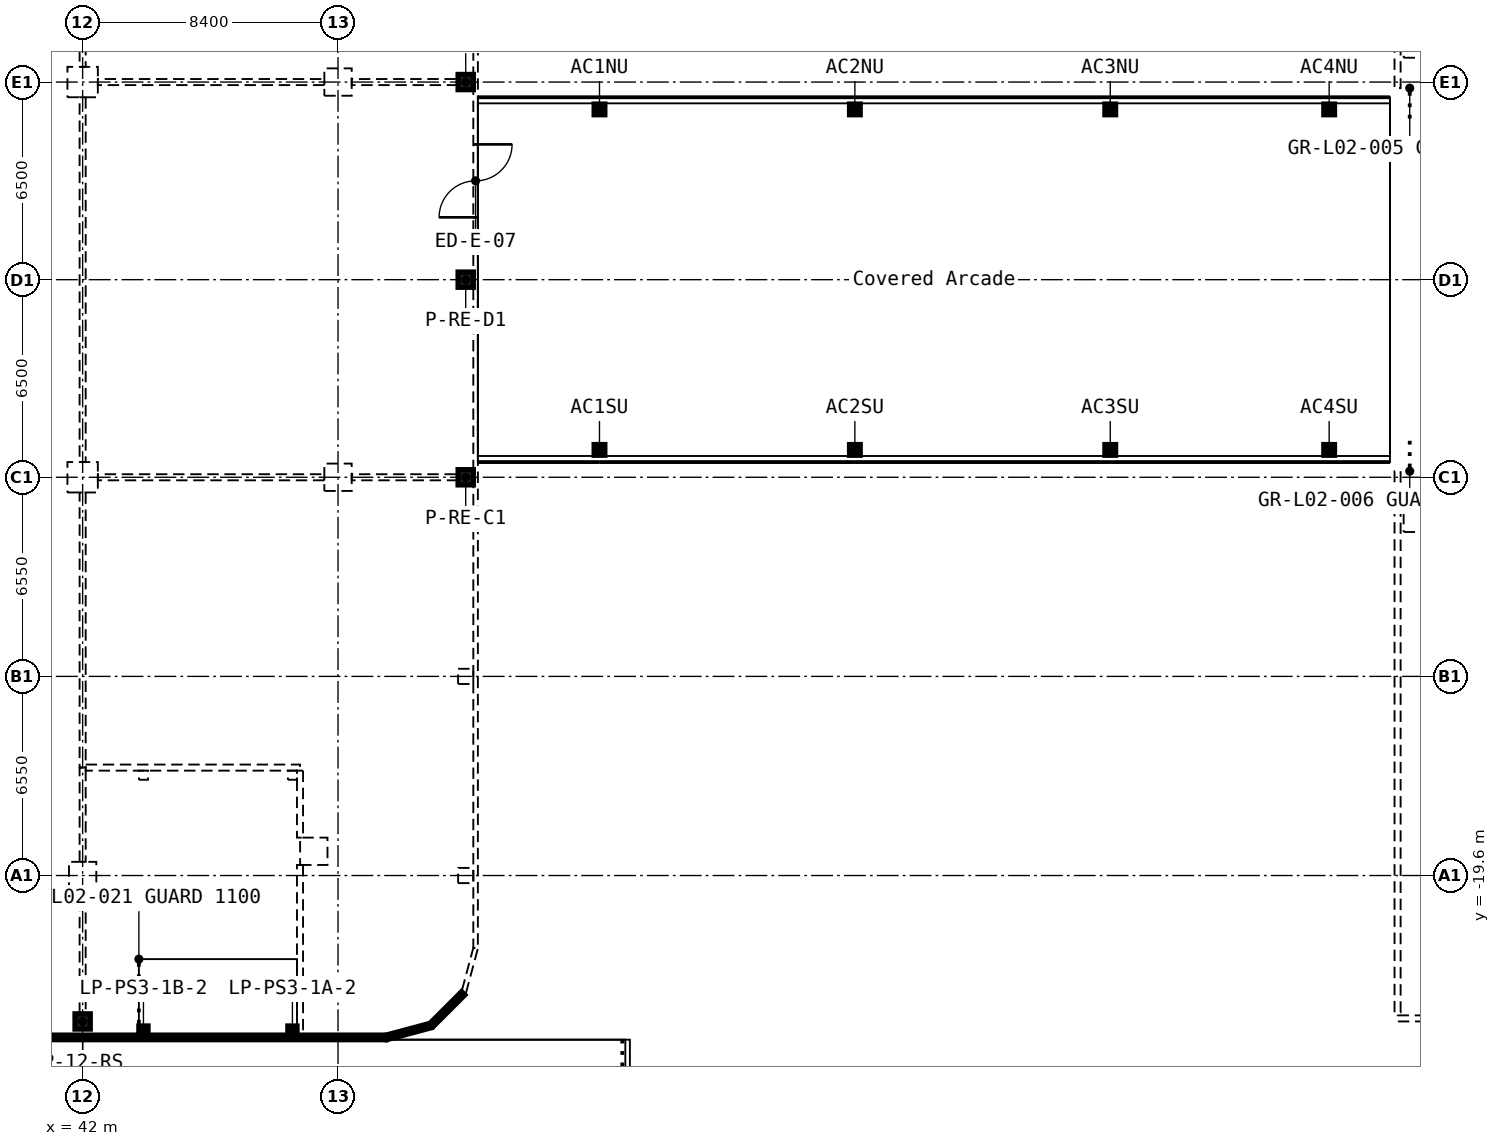
"""IFC4 building model, lengths in metres.
Left out: names, types, materials, properties, quantities, classifications, styles, units other than length and angle.
Written with IfcOpenShell. Run it as: python <this file> out.ifc"""

import sys

from ifc_helpers import new_model, si_unit, direction, frame, frame_2d, origin, origin_2d, place, context, subcontext, project, spatial, rectangle, hollow_rectangle, extrude, element, fill, save


model = new_model("IFC4")
c1 = context("Model", 3, precision=1e-05, world=origin(), true_north=direction((0.0, 1.0)))
c2 = subcontext(c1, "Body", "Model", "MODEL_VIEW")
j1 = project(units=[si_unit("LENGTHUNIT", "METRE"), si_unit("PLANEANGLEUNIT", "RADIAN")], contexts=[c1])
p1 = place(None, origin())
s1 = spatial("IfcSite", under=j1, at=p1, CompositionType="ELEMENT")
p2 = place(p1, origin())
s2 = spatial("IfcBuilding", under=s1, at=p2, CompositionType="ELEMENT")
p3 = place(p2, frame((0.0, 0.0, 9.0)))
s3 = spatial("IfcBuildingStorey", under=s2, at=p3, CompositionType="ELEMENT", Elevation=9.0)
p4 = place(p3, frame((42.0, -19.6, 0.0), z_axis=(0.0, 0.0, 1.0), x_axis=(1.0, 0.0, 0.0)))
e1 = element("IfcColumn", 1, at=p4, inside=s3, PredefinedType="COLUMN", context=c2, shape_type="SweptSolid", body=[
    extrude(hollow_rectangle(XDim=0.9, YDim=0.9, WallThickness=0.036, at=origin_2d()), origin(), (0.0, 0.0, 1.0), 5.6),
])
for number, where, z_axis, x_axis in (
    (2, (42.0, -6.5, 0.0), (0.0, 0.0, 1.0), (1.0, 0.0, 0.0)),
    (3, (42.0, 6.5, 0.0), (0.0, 0.0, 1.0), (1.0, 0.0, 0.0)),
):
    element("IfcColumn", number, at=place(p3, frame(where, z_axis=z_axis, x_axis=x_axis)), inside=s3, PredefinedType="COLUMN", context=c2, shape_type="SweptSolid", body=[
        extrude(hollow_rectangle(XDim=1.0, YDim=1.0, WallThickness=0.04, at=origin_2d()), origin(), (0.0, 0.0, 1.0), 5.6),
    ])
for number, where, z_axis, x_axis in (
    (4, (49.603, -18.803, 0.0), (0.0, 0.0, 1.0), (1.0, 0.0, 0.0)),
    (5, (50.4, -6.5, 0.0), (0.0, 0.0, 1.0), (1.0, 0.0, 0.0)),
    (6, (50.4, 6.5, 0.0), (0.0, 0.0, 1.0), (1.0, 0.0, 0.0)),
):
    element("IfcColumn", number, at=place(p3, frame(where, z_axis=z_axis, x_axis=x_axis)), inside=s3, PredefinedType="COLUMN", context=c2, shape_type="SweptSolid", body=[
        extrude(hollow_rectangle(XDim=0.9, YDim=0.9, WallThickness=0.036, at=origin_2d()), origin(), (0.0, 0.0, 1.0), 5.6),
    ])
for number, where, z_axis, x_axis in (
    (7, (42.0, -24.4, 0.0), (0.0, 0.0, 1.0), (1.0, 0.0, 0.0)),
    (8, (54.6, -19.6, 0.0), (0.0, 0.0, 1.0), (1.0, 0.0, 0.0)),
    (9, (54.6, -13.05, 0.0), (0.0, 0.0, 1.0), (1.0, 0.0, 0.0)),
    (10, (54.6, -6.5, 0.0), (0.0, 0.0, 1.0), (1.0, 0.0, 0.0)),
    (11, (54.6, 0.0, 0.0), (0.0, 0.0, 1.0), (1.0, 0.0, 0.0)),
    (12, (54.6, 6.5, 0.0), (0.0, 0.0, 1.0), (1.0, 0.0, 0.0)),
):
    element("IfcColumn", number, at=place(p3, frame(where, z_axis=z_axis, x_axis=x_axis)), inside=s3, PredefinedType="COLUMN", context=c2, shape_type="SweptSolid", body=[
        extrude(hollow_rectangle(XDim=0.5, YDim=0.5, WallThickness=0.019, InnerFilletRadius=0.029, OuterFilletRadius=0.048, at=origin_2d()), origin(), (0.0, 0.0, 1.0), 5.6),
    ])
for number, where, z_axis, x_axis in (
    (13, (59.0, -5.6, 0.0), (0.0, 0.0, 1.0), (1.0, 0.0, 0.0)),
    (14, (59.0, 5.6, 0.0), (0.0, 0.0, 1.0), (1.0, 0.0, 0.0)),
    (15, (67.4, -5.6, 0.0), (0.0, 0.0, 1.0), (1.0, 0.0, 0.0)),
    (16, (67.4, 5.6, 0.0), (0.0, 0.0, 1.0), (1.0, 0.0, 0.0)),
    (17, (75.8, -5.6, 0.0), (0.0, 0.0, 1.0), (1.0, 0.0, 0.0)),
    (18, (75.8, 5.6, 0.0), (0.0, 0.0, 1.0), (1.0, 0.0, 0.0)),
    (19, (83.0, -5.6, 0.0), (0.0, 0.0, 1.0), (1.0, 0.0, 0.0)),
    (20, (83.0, 5.6, 0.0), (0.0, 0.0, 1.0), (1.0, 0.0, 0.0)),
):
    element("IfcColumn", number, at=place(p3, frame(where, z_axis=z_axis, x_axis=x_axis)), inside=s3, PredefinedType="COLUMN", context=c2, shape_type="SweptSolid", body=[
        extrude(hollow_rectangle(XDim=0.35, YDim=0.35, WallThickness=0.012, OuterFilletRadius=0.026, at=origin_2d()), origin(), (0.0, 0.0, 1.0), 3.9),
    ])
for number, where, z_axis, x_axis in (
    (21, (85.95, -7.8, 0.0), (0.0, 0.0, 1.0), (1.0, 0.0, 0.0)),
    (22, (85.95, 7.8, 0.0), (0.0, 0.0, 1.0), (1.0, 0.0, 0.0)),
):
    element("IfcColumn", number, at=place(p3, frame(where, z_axis=z_axis, x_axis=x_axis)), inside=s3, PredefinedType="COLUMN", context=c2, shape_type="SweptSolid", body=[
        extrude(hollow_rectangle(XDim=1.0, YDim=1.0, WallThickness=0.036, at=origin_2d()), origin(), (0.0, 0.0, 1.0), 5.5),
    ])
p5 = place(p3, frame((59.925, -67.0, -0.06), z_axis=(0.0, 0.0, 1.0), x_axis=(0.0, 1.0, 0.0)))
e23 = element("IfcWall", 23, at=p5, inside=s3, PredefinedType="STANDARD", context=c2, shape_type="SweptSolid", body=[
    extrude(rectangle(XDim=42.0, YDim=0.15, at=frame_2d((21.0, 0.0))), origin(), (0.0, 0.0, 1.0), 0.41),
])
for number, where, z_axis, x_axis in (
    (24, (48.9, -16.3, -0.3), (0.0, 0.0, 1.0), (1.0, 0.0, 0.0)),
    (25, (44.0, -16.3, -0.3), (0.0, 0.0, 1.0), (1.0, 0.0, 0.0)),
):
    element("IfcColumn", number, at=place(p3, frame(where, z_axis=z_axis, x_axis=x_axis)), inside=s3, PredefinedType="COLUMN", context=c2, shape_type="SweptSolid", body=[
        extrude(rectangle(XDim=0.3, YDim=0.3, at=origin_2d()), origin(), (0.0, 0.0, 1.0), 1.55),
    ])
p6 = place(p3, frame((54.35, -6.5, 0.0), z_axis=(0.0, 0.0, 1.0), x_axis=(-1.0, 0.0, 0.0)))
e26 = element("IfcWall", 26, at=p6, inside=s3, PredefinedType="PARTITIONING", context=c2, shape_type="SweptSolid", body=[
    extrude(rectangle(XDim=3.5, YDim=0.2, at=frame_2d((1.75, 0.0))), origin(), (0.0, 0.0, 1.0), 5.6),
])
p7 = place(p3, frame((49.95, -6.5, 0.0), z_axis=(0.0, 0.0, 1.0), x_axis=(-1.0, 0.0, 0.0)))
e27 = element("IfcWall", 27, at=p7, inside=s3, PredefinedType="PARTITIONING", context=c2, shape_type="SweptSolid", body=[
    extrude(rectangle(XDim=7.45, YDim=0.2, at=frame_2d((3.725, 0.0))), origin(), (0.0, 0.0, 1.0), 5.6),
])
p8 = place(p3, frame((54.35, 6.5, 0.0), z_axis=(0.0, 0.0, 1.0), x_axis=(-1.0, 0.0, 0.0)))
e28 = element("IfcWall", 28, at=p8, inside=s3, PredefinedType="PARTITIONING", context=c2, shape_type="SweptSolid", body=[
    extrude(rectangle(XDim=3.5, YDim=0.2, at=frame_2d((1.75, 0.0))), origin(), (0.0, 0.0, 1.0), 5.6),
])
p9 = place(p3, frame((49.95, 6.5, 0.0), z_axis=(0.0, 0.0, 1.0), x_axis=(-1.0, 0.0, 0.0)))
e29 = element("IfcWall", 29, at=p9, inside=s3, PredefinedType="PARTITIONING", context=c2, shape_type="SweptSolid", body=[
    extrude(rectangle(XDim=7.45, YDim=0.2, at=frame_2d((3.725, 0.0))), origin(), (0.0, 0.0, 1.0), 5.6),
])
p10 = place(p3, frame((42.0, 6.0, 0.0), z_axis=(0.0, 0.0, 1.0), x_axis=(0.0, -1.0, 0.0)))
e30 = element("IfcWall", 30, at=p10, inside=s3, PredefinedType="PARTITIONING", context=c2, shape_type="SweptSolid", body=[
    extrude(rectangle(XDim=12.0, YDim=0.2, at=frame_2d((6.0, 0.0))), origin(), (0.0, 0.0, 1.0), 5.6),
])
p11 = place(p10, frame((1.55, 0.0, 0.0)))
e31 = element("IfcOpeningElement", 31, at=p11, cuts=e30, PredefinedType="OPENING", context=c2, shape_type="SweptSolid", body=[
    extrude(rectangle(XDim=2.4, YDim=2.1, at=frame_2d((1.2, 1.05))), frame((0.0, 0.11, 0.0), z_axis=(0.0, -1.0, 0.0), x_axis=(1.0, 0.0, 0.0)), (0.0, 0.0, 1.0), 0.22),
])
p12 = place(p3, frame((42.0, -7.0, 0.0), z_axis=(0.0, 0.0, 1.0), x_axis=(0.0, -1.0, 0.0)))
e32 = element("IfcWall", 32, at=p12, inside=s3, PredefinedType="PARTITIONING", context=c2, shape_type="SweptSolid", body=[
    extrude(rectangle(XDim=9.05, YDim=0.2, at=frame_2d((4.525, 0.0))), origin(), (0.0, 0.0, 1.0), 5.6),
])
p13 = place(p12, frame((6.1, 0.0, 0.0)))
e33 = element("IfcOpeningElement", 33, at=p13, cuts=e32, PredefinedType="OPENING", context=c2, shape_type="SweptSolid", body=[
    extrude(rectangle(XDim=1.8, YDim=2.1, at=frame_2d((0.9, 1.05))), frame((0.0, 0.11, 0.0), z_axis=(0.0, -1.0, 0.0), x_axis=(1.0, 0.0, 0.0)), (0.0, 0.0, 1.0), 0.22),
])
p14 = place(p3, frame((42.0, 16.05, 0.0), z_axis=(0.0, 0.0, 1.0), x_axis=(0.0, -1.0, 0.0)))
e34 = element("IfcWall", 34, at=p14, inside=s3, PredefinedType="PARTITIONING", context=c2, shape_type="SweptSolid", body=[
    extrude(rectangle(XDim=9.05, YDim=0.2, at=frame_2d((4.525, 0.0))), origin(), (0.0, 0.0, 1.0), 5.6),
])
p15 = place(p14, frame((1.15, 0.0, 0.0)))
e35 = element("IfcOpeningElement", 35, at=p15, cuts=e34, PredefinedType="OPENING", context=c2, shape_type="SweptSolid", body=[
    extrude(rectangle(XDim=1.8, YDim=2.1, at=frame_2d((0.9, 1.05))), frame((0.0, 0.11, 0.0), z_axis=(0.0, -1.0, 0.0), x_axis=(1.0, 0.0, 0.0)), (0.0, 0.0, 1.0), 0.22),
])
p16 = place(p3, frame((42.1, -16.05, 0.0), z_axis=(0.0, 0.0, 1.0), x_axis=(1.0, 0.0, 0.0)))
e36 = element("IfcWall", 36, at=p16, inside=s3, PredefinedType="SHEAR", context=c2, shape_type="SweptSolid", body=[
    extrude(rectangle(XDim=7.05, YDim=0.2, at=frame_2d((3.525, 0.0))), origin(), (0.0, 0.0, 1.0), 5.6),
])
p17 = place(p3, frame((49.15, -16.15, 0.0), z_axis=(0.0, 0.0, 1.0), x_axis=(0.0, -1.0, 0.0)))
e37 = element("IfcWall", 37, at=p17, inside=s3, PredefinedType="SHEAR", context=c2, shape_type="SweptSolid", body=[
    extrude(rectangle(XDim=2.203, YDim=0.2, at=frame_2d((1.102, 0.0))), origin(), (0.0, 0.0, 1.0), 5.6),
])
p18 = place(p3, frame((49.15, -19.253, 0.0), z_axis=(0.0, 0.0, 1.0), x_axis=(0.0, -1.0, 0.0)))
e38 = element("IfcWall", 38, at=p18, inside=s3, PredefinedType="SHEAR", context=c2, shape_type="SweptSolid", body=[
    extrude(rectangle(XDim=5.597, YDim=0.2, at=frame_2d((2.798, 0.0))), origin(), (0.0, 0.0, 1.0), 5.6),
])
p19 = place(p3, frame((42.0, -24.15, 0.0), z_axis=(0.0, 0.0, 1.0), x_axis=(0.0, 1.0, 0.0)))
e39 = element("IfcWall", 39, at=p19, inside=s3, PredefinedType="SHEAR", context=c2, shape_type="SweptSolid", body=[
    extrude(rectangle(XDim=4.1, YDim=0.2, at=frame_2d((2.05, 0.0))), origin(), (0.0, 0.0, 1.0), 5.6),
])
p20 = place(p19, frame((1.55, 0.0, 0.0)))
e40 = element("IfcOpeningElement", 40, at=p20, cuts=e39, PredefinedType="OPENING", context=c2, shape_type="SweptSolid", body=[
    extrude(rectangle(XDim=1.2, YDim=2.1, at=frame_2d((0.6, 1.05))), frame((0.0, 0.11, 0.0), z_axis=(0.0, -1.0, 0.0), x_axis=(1.0, 0.0, 0.0)), (0.0, 0.0, 1.0), 0.22),
])
p21 = place(p3, frame((42.0, -19.15, 0.0), z_axis=(0.0, 0.0, 1.0), x_axis=(0.0, 1.0, 0.0)))
e41 = element("IfcWall", 41, at=p21, inside=s3, PredefinedType="SHEAR", context=c2, shape_type="SweptSolid", body=[
    extrude(rectangle(XDim=3.1, YDim=0.2, at=frame_2d((1.55, 0.0))), origin(), (0.0, 0.0, 1.0), 5.6),
])
p22 = place(p3, frame((54.922, -22.0, 0.0), z_axis=(0.0, 0.0, 1.0), x_axis=(-0.258741535379, -0.965946591624, 0.0)))
e42 = element("IfcWall", 42, at=p22, inside=s3, PredefinedType="STANDARD", context=c2, shape_type="SweptSolid", body=[
    extrude(rectangle(XDim=1.493, YDim=0.15, at=frame_2d((0.746, 0.0))), origin(), (0.0, 0.0, 1.0), 5.6),
])
p23 = place(p3, frame((54.517, -23.475, 0.0), z_axis=(0.0, 0.0, 1.0), x_axis=(-0.707106781187, -0.707106781187, 0.0)))
e43 = element("IfcWall", 43, at=p23, inside=s3, PredefinedType="STANDARD", context=c2, shape_type="SweptSolid", body=[
    extrude(rectangle(XDim=1.473, YDim=0.15, at=frame_2d((0.736, 0.0))), origin(), (0.0, 0.0, 1.0), 5.6),
])
p24 = place(p3, frame((53.442, -24.536, 0.0), z_axis=(0.0, 0.0, 1.0), x_axis=(-0.965946591624, -0.258741535379, 0.0)))
e44 = element("IfcWall", 44, at=p24, inside=s3, PredefinedType="STANDARD", context=c2, shape_type="SweptSolid", body=[
    extrude(rectangle(XDim=1.493, YDim=0.15, at=frame_2d((0.746, 0.0))), origin(), (0.0, 0.0, 1.0), 5.6),
])
p25 = place(p3, frame((51.98, -24.925, 0.0), z_axis=(0.0, 0.0, 1.0), x_axis=(-1.0, 0.0, 0.0)))
e45 = element("IfcWall", 45, at=p25, inside=s3, PredefinedType="STANDARD", context=c2, shape_type="SweptSolid", body=[
    extrude(rectangle(XDim=12.98, YDim=0.15, at=frame_2d((6.49, 0.0))), origin(), (0.0, 0.0, 1.0), 5.6),
])
p26 = place(p3, frame((54.925, 21.98, 0.0), z_axis=(0.0, 0.0, 1.0), x_axis=(0.0, -1.0, 0.0)))
e46 = element("IfcWall", 46, at=p26, inside=s3, PredefinedType="STANDARD", context=c2, shape_type="SweptSolid", body=[
    extrude(rectangle(XDim=43.96, YDim=0.15, at=frame_2d((21.98, 0.0))), origin(), (0.0, 0.0, 1.0), 5.6),
])
p27 = place(p26, frame((17.53, 0.0, 0.0)))
e47 = element("IfcOpeningElement", 47, at=p27, cuts=e46, PredefinedType="OPENING", context=c2, shape_type="SweptSolid", body=[
    extrude(rectangle(XDim=2.4, YDim=2.1, at=frame_2d((1.2, 1.05))), frame((0.0, 0.085, 0.0), z_axis=(0.0, -1.0, 0.0), x_axis=(1.0, 0.0, 0.0)), (0.0, 0.0, 1.0), 0.17),
])
for number, where, z_axis, x_axis in (
    (48, (48.9, -24.7, 0.0), (0.0, 0.0, 1.0), (1.0, 0.0, 0.0)),
    (49, (44.0, -24.7, 0.0), (0.0, 0.0, 1.0), (1.0, 0.0, 0.0)),
    (50, (48.9, -16.3, 1.5), (0.0, 0.0, 1.0), (1.0, 0.0, 0.0)),
    (51, (44.0, -16.3, 1.5), (0.0, 0.0, 1.0), (1.0, 0.0, 0.0)),
):
    element("IfcColumn", number, at=place(p3, frame(where, z_axis=z_axis, x_axis=x_axis)), inside=s3, PredefinedType="COLUMN", context=c2, shape_type="SweptSolid", body=[
        extrude(rectangle(XDim=0.3, YDim=0.3, at=origin_2d()), origin(), (0.0, 0.0, 1.0), 2.75),
    ])
p28 = place(p3, frame((0.0, 0.0, 4.4)))
p29 = place(p28, frame((61.1, 0.0, 0.0)))
p30 = place(p29, frame((0.0, 0.0, 0.15)))
e52 = element("IfcWindow", 52, at=p30, inside=s3, PartitioningType="SINGLE_PANEL", PredefinedType="SKYLIGHT", context=c2, shape_type="SweptSolid", body=[
    extrude(rectangle(XDim=3.0, YDim=6.0, at=origin_2d()), origin(), (0.0, 0.0, 1.0), 0.05),
])
p31 = place(p28, frame((65.3, 0.0, 0.0)))
p32 = place(p31, frame((0.0, 0.0, 0.15)))
e53 = element("IfcWindow", 53, at=p32, inside=s3, PartitioningType="SINGLE_PANEL", PredefinedType="SKYLIGHT", context=c2, shape_type="SweptSolid", body=[
    extrude(rectangle(XDim=3.0, YDim=6.0, at=origin_2d()), origin(), (0.0, 0.0, 1.0), 0.05),
])
p33 = place(p28, frame((69.5, 0.0, 0.0)))
p34 = place(p33, frame((0.0, 0.0, 0.15)))
e54 = element("IfcWindow", 54, at=p34, inside=s3, PartitioningType="SINGLE_PANEL", PredefinedType="SKYLIGHT", context=c2, shape_type="SweptSolid", body=[
    extrude(rectangle(XDim=3.0, YDim=6.0, at=origin_2d()), origin(), (0.0, 0.0, 1.0), 0.05),
])
p35 = place(p28, frame((73.7, 0.0, 0.0)))
p36 = place(p35, frame((0.0, 0.0, 0.15)))
e55 = element("IfcWindow", 55, at=p36, inside=s3, PartitioningType="SINGLE_PANEL", PredefinedType="SKYLIGHT", context=c2, shape_type="SweptSolid", body=[
    extrude(rectangle(XDim=3.0, YDim=6.0, at=origin_2d()), origin(), (0.0, 0.0, 1.0), 0.05),
])
p37 = place(p20, origin())
e56 = element("IfcDoor", 56, at=p37, inside=s3, OperationType="SINGLE_SWING_LEFT", PredefinedType="DOOR", context=c2, shape_type="SweptSolid", body=[
    extrude(rectangle(XDim=1.2, YDim=2.1, at=frame_2d((0.6, 1.05))), frame((0.0, 0.025, 0.0), z_axis=(0.0, -1.0, 0.0), x_axis=(1.0, 0.0, 0.0)), (0.0, 0.0, 1.0), 0.05),
])
fill(e40, e56)
p38 = place(p13, origin())
e57 = element("IfcDoor", 57, at=p38, inside=s3, OperationType="DOUBLE_DOOR_SINGLE_SWING", PredefinedType="DOOR", context=c2, shape_type="SweptSolid", body=[
    extrude(rectangle(XDim=1.8, YDim=2.1, at=frame_2d((0.9, 1.05))), frame((0.0, 0.025, 0.0), z_axis=(0.0, -1.0, 0.0), x_axis=(1.0, 0.0, 0.0)), (0.0, 0.0, 1.0), 0.05),
])
fill(e33, e57)
p39 = place(p11, origin())
e58 = element("IfcDoor", 58, at=p39, inside=s3, OperationType="DOUBLE_DOOR_SINGLE_SWING", PredefinedType="DOOR", context=c2, shape_type="SweptSolid", body=[
    extrude(rectangle(XDim=2.4, YDim=2.1, at=frame_2d((1.2, 1.05))), frame((0.0, 0.025, 0.0), z_axis=(0.0, -1.0, 0.0), x_axis=(1.0, 0.0, 0.0)), (0.0, 0.0, 1.0), 0.05),
])
fill(e31, e58)
p40 = place(p27, origin())
e59 = element("IfcDoor", 59, at=p40, inside=s3, OperationType="DOUBLE_DOOR_DOUBLE_SWING", PredefinedType="DOOR", context=c2, shape_type="SweptSolid", body=[
    extrude(rectangle(XDim=2.4, YDim=2.1, at=frame_2d((1.2, 1.05))), frame((0.0, 0.025, 0.0), z_axis=(0.0, -1.0, 0.0), x_axis=(1.0, 0.0, 0.0)), (0.0, 0.0, 1.0), 0.05),
])
fill(e47, e59)
save(model, sys.argv[1])
